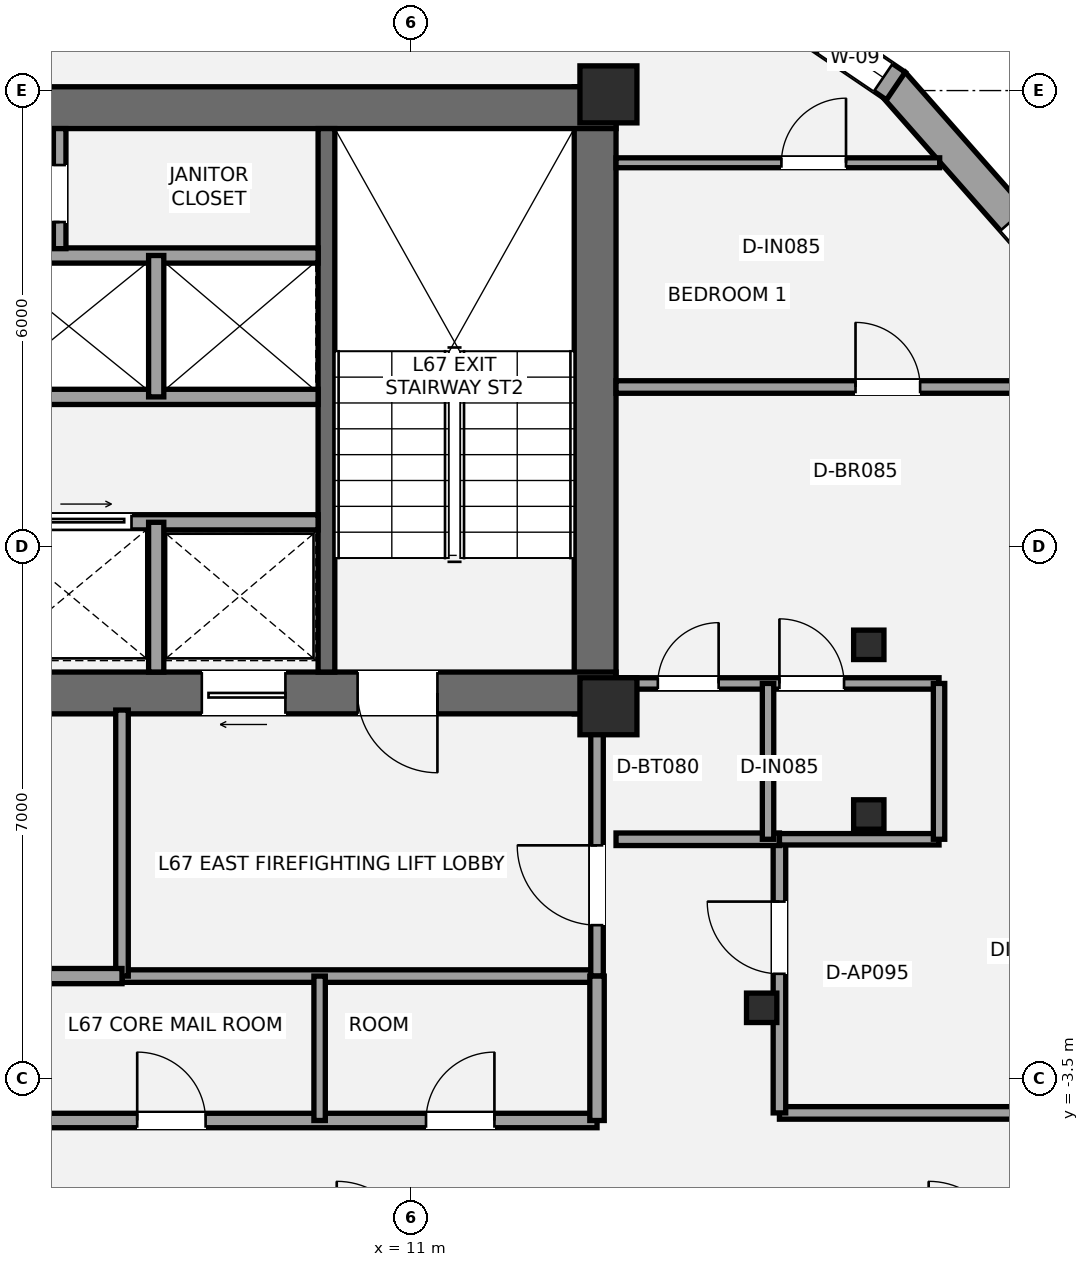
"""IFC4 building model, lengths in metres.
Left out: names, types, materials, properties, quantities, classifications, styles, units other than length and angle.
Written with IfcOpenShell. Run it as: python <this file> out.ifc"""

import sys

from ifc_helpers import new_model, si_unit, direction, frame, frame_2d, origin, origin_2d, place, context, subcontext, project, spatial, rectangle, i_section, extrude, element, fill, save


model = new_model("IFC4")
c1 = context("Model", 3, precision=1e-05, world=origin(), true_north=direction((0.0, 1.0)))
c2 = subcontext(c1, "Body", "Model", "MODEL_VIEW")
j1 = project(units=[si_unit("LENGTHUNIT", "METRE"), si_unit("PLANEANGLEUNIT", "RADIAN")], contexts=[c1])
p1 = place(None, origin())
s1 = spatial("IfcSite", under=j1, at=p1, CompositionType="ELEMENT")
p2 = place(p1, origin())
s2 = spatial("IfcBuilding", under=s1, at=p2, CompositionType="ELEMENT")
p3 = place(p2, frame((0.0, 0.0, 238.35)))
s3 = spatial("IfcBuildingStorey", under=s2, at=p3, CompositionType="ELEMENT", Elevation=238.35)
p4 = place(p3, frame((13.425, 1.3, 0.0), z_axis=(0.0, 0.0, 1.0), x_axis=(0.0, 1.0, 0.0)))
e1 = element("IfcWall", 1, at=p4, inside=s3, PredefinedType="SHEAR", context=c2, shape_type="SweptSolid", body=[
    extrude(rectangle(XDim=8.25, YDim=0.55, at=frame_2d((4.125, 0.0))), origin(), (0.0, 0.0, 1.0), 3.15),
])
p5 = place(p3, frame((4.525, 9.275, 0.0), z_axis=(0.0, 0.0, 1.0), x_axis=(1.0, 0.0, 0.0)))
e2 = element("IfcWall", 2, at=p5, inside=s3, PredefinedType="SHEAR", context=c2, shape_type="SweptSolid", body=[
    extrude(rectangle(XDim=9.175, YDim=0.55, at=frame_2d((4.587, 0.0))), origin(), (0.0, 0.0, 1.0), 3.15),
])
p6 = place(p3, frame((13.7, 1.575, 0.0), z_axis=(0.0, 0.0, 1.0), x_axis=(-1.0, 0.0, 0.0)))
e3 = element("IfcWall", 3, at=p6, inside=s3, PredefinedType="SHEAR", context=c2, shape_type="SweptSolid", body=[
    extrude(rectangle(XDim=8.775, YDim=0.55, at=frame_2d((4.387, 0.0))), origin(), (0.0, 0.0, 1.0), 3.15),
])
p7 = place(p6, frame((2.35, 0.0, 0.0)))
e4 = element("IfcOpeningElement", 4, at=p7, cuts=e3, PredefinedType="OPENING", context=c2, shape_type="SweptSolid", body=[
    extrude(rectangle(XDim=1.05, YDim=2.15, at=frame_2d((0.525, 1.075))), frame((0.0, 0.285, 0.0), z_axis=(0.0, -1.0, 0.0), x_axis=(1.0, 0.0, 0.0)), (0.0, 0.0, 1.0), 0.57),
])
p8 = place(p6, frame((4.35, 0.0, 0.0)))
e5 = element("IfcOpeningElement", 5, at=p8, cuts=e3, PredefinedType="OPENING", context=c2, shape_type="SweptSolid", body=[
    extrude(rectangle(XDim=1.1, YDim=2.2, at=frame_2d((0.55, 1.1))), frame((0.0, 0.285, 0.0), z_axis=(0.0, -1.0, 0.0), x_axis=(1.0, 0.0, 0.0)), (0.0, 0.0, 1.0), 0.57),
])
p9 = place(p3, frame((9.89, 1.85, 0.0), z_axis=(0.0, 0.0, 1.0), x_axis=(0.0, 1.0, 0.0)))
e6 = element("IfcWall", 6, at=p9, inside=s3, PredefinedType="SHEAR", context=c2, shape_type="SweptSolid", body=[
    extrude(rectangle(XDim=7.15, YDim=0.22, at=frame_2d((3.575, 0.0))), origin(), (0.0, 0.0, 1.0), 3.15),
])
for number, where, z_axis, x_axis in (
    (7, (13.6, 1.4, 0.0), (0.0, 0.0, 1.0), (1.0, 0.0, 0.0)),
    (8, (13.6, 9.45, 0.0), (0.0, 0.0, 1.0), (1.0, 0.0, 0.0)),
):
    element("IfcColumn", number, at=place(p3, frame(where, z_axis=z_axis, x_axis=x_axis)), inside=s3, PredefinedType="PILASTER", context=c2, shape_type="SweptSolid", body=[
        extrude(rectangle(XDim=0.75, YDim=0.75, at=origin_2d()), origin(), (0.0, 0.0, 1.0), 3.15),
    ])
for number, where, z_axis, x_axis in (
    (9, (17.026, 2.208, 0.0), (0.0, 0.0, 1.0), (1.0, 0.0, 0.0)),
    (10, (15.616, -2.567, 0.0), (0.0, 0.0, 1.0), (1.0, 0.0, 0.0)),
    (11, (17.026, -0.024, 0.0), (0.0, 0.0, 1.0), (1.0, 0.0, 0.0)),
):
    element("IfcColumn", number, at=place(p3, frame(where, z_axis=z_axis, x_axis=x_axis)), inside=s3, PredefinedType="COLUMN", context=c2, shape_type="SweptSolid", body=[
        extrude(i_section(OverallWidth=0.399, OverallDepth=0.387, WebThickness=0.021, FlangeThickness=0.033, at=origin_2d()), origin(), (0.0, 0.0, 1.0), 3.15),
    ])
p10 = place(p3, frame((17.34, 9.596, 0.0), z_axis=(0.0, 0.0, 1.0), x_axis=(0.66136043846, -0.750068243855, 0.0)))
e12 = element("IfcWall", 12, at=p10, inside=s3, PredefinedType="STANDARD", context=c2, shape_type="SweptSolid", body=[
    extrude(rectangle(XDim=3.432, YDim=0.44, at=frame_2d((1.716, 0.0))), origin(), (0.0, 0.0, 1.0), 2.336),
])
p11 = place(p10, frame((2.392, 0.0, 0.88)))
e13 = element("IfcOpeningElement", 13, at=p11, cuts=e12, PredefinedType="OPENING", context=c2, shape_type="SweptSolid", body=[
    extrude(rectangle(XDim=0.9, YDim=1.35, at=frame_2d((0.45, 0.675))), frame((0.0, 0.23, 0.0), z_axis=(0.0, -1.0, 0.0), x_axis=(1.0, 0.0, 0.0)), (0.0, 0.0, 1.0), 0.46),
])
p12 = place(p3, frame((14.242, 11.688, 0.0), z_axis=(0.0, 0.0, 1.0), x_axis=(0.827637036896, -0.561263694851, 0.0)))
e14 = element("IfcWall", 14, at=p12, inside=s3, PredefinedType="STANDARD", context=c2, shape_type="SweptSolid", body=[
    extrude(rectangle(XDim=3.793, YDim=0.44, at=frame_2d((1.896, 0.0))), origin(), (0.0, 0.0, 1.0), 2.336),
])
p13 = place(p12, frame((2.693, 0.0, 0.58)))
e15 = element("IfcOpeningElement", 15, at=p13, cuts=e14, PredefinedType="OPENING", context=c2, shape_type="SweptSolid", body=[
    extrude(rectangle(XDim=0.9, YDim=1.35, at=frame_2d((0.45, 0.675))), frame((0.0, 0.23, 0.0), z_axis=(0.0, -1.0, 0.0), x_axis=(1.0, 0.0, 0.0)), (0.0, 0.0, 1.0), 0.46),
])
p14 = place(p3, frame((7.2, -2.15, 0.0), z_axis=(0.0, 0.0, 1.0), x_axis=(1.0, 0.0, 0.0)))
e16 = element("IfcWall", 16, at=p14, inside=s3, PredefinedType="PARTITIONING", context=c2, shape_type="SweptSolid", body=[
    extrude(rectangle(XDim=6.25, YDim=0.165, at=frame_2d((3.125, 0.0))), origin(), (0.0, 0.0, 1.0), 2.97),
])
p15 = place(p3, frame((7.2, -2.15, 0.0), z_axis=(0.0, 0.0, 1.0), x_axis=(0.0, 1.0, 0.0)))
e17 = element("IfcWall", 17, at=p15, inside=s3, PredefinedType="PARTITIONING", context=c2, shape_type="SweptSolid", body=[
    extrude(rectangle(XDim=3.5, YDim=0.165, at=frame_2d((1.75, 0.0))), origin(), (0.0, 0.0, 1.0), 2.423),
])
p16 = place(p3, frame((13.45, -2.15, 0.0), z_axis=(0.0, 0.0, 1.0), x_axis=(0.0, 1.0, 0.0)))
e18 = element("IfcWall", 18, at=p16, inside=s3, PredefinedType="PARTITIONING", context=c2, shape_type="SweptSolid", body=[
    extrude(rectangle(XDim=3.5, YDim=0.165, at=frame_2d((1.75, 0.0))), origin(), (0.0, 0.0, 1.0), 2.423),
])
p17 = place(p16, frame((0.67, 0.0, 0.0)))
e19 = element("IfcOpeningElement", 19, at=p17, cuts=e18, PredefinedType="OPENING", context=c2, shape_type="SweptSolid", body=[
    extrude(rectangle(XDim=1.05, YDim=2.15, at=frame_2d((0.525, 1.075))), frame((0.0, 0.093, 0.0), z_axis=(0.0, -1.0, 0.0), x_axis=(1.0, 0.0, 0.0)), (0.0, 0.0, 1.0), 0.185),
])
p18 = place(p3, frame((4.95, -2.15, 0.0), z_axis=(0.0, 0.0, 1.0), x_axis=(1.0, 0.0, 0.0)))
e20 = element("IfcWall", 20, at=p18, inside=s3, PredefinedType="SOLIDWALL", context=c2, shape_type="SweptSolid", body=[
    extrude(rectangle(XDim=2.25, YDim=0.2, at=frame_2d((1.125, 0.0))), origin(), (0.0, 0.0, 1.0), 2.97),
])
p19 = place(p3, frame((5.475, 3.82, 0.0), z_axis=(0.0, 0.0, 1.0), x_axis=(1.0, 0.0, 0.0)))
e21 = element("IfcWall", 21, at=p19, inside=s3, PredefinedType="SOLIDWALL", context=c2, shape_type="SweptSolid", body=[
    extrude(rectangle(XDim=4.305, YDim=0.2, at=frame_2d((2.152, 0.0))), origin(), (0.0, 0.0, 1.0), 2.97),
])
p20 = place(p19, frame((0.65, 0.0, 0.0)))
e22 = element("IfcOpeningElement", 22, at=p20, cuts=e21, PredefinedType="OPENING", context=c2, shape_type="SweptSolid", body=[
    extrude(rectangle(XDim=1.2, YDim=2.2, at=frame_2d((0.6, 1.1))), frame((0.0, 0.11, 0.0), z_axis=(0.0, -1.0, 0.0), x_axis=(1.0, 0.0, 0.0)), (0.0, 0.0, 1.0), 0.22),
])
p21 = place(p3, frame((7.65, 1.85, 0.0), z_axis=(0.0, 0.0, 1.0), x_axis=(0.0, 1.0, 0.0)))
e23 = element("IfcWall", 23, at=p21, inside=s3, PredefinedType="SOLIDWALL", context=c2, shape_type="SweptSolid", body=[
    extrude(rectangle(XDim=1.97, YDim=0.2, at=frame_2d((0.985, 0.0))), origin(), (0.0, 0.0, 1.0), 2.97),
])
for number, where, z_axis, x_axis in (
    (24, (5.475, 5.47, 0.0), (0.0, 0.0, 1.0), (1.0, 0.0, 0.0)),
    (25, (5.475, 7.33, 0.0), (0.0, 0.0, 1.0), (1.0, 0.0, 0.0)),
):
    element("IfcWall", number, at=place(p3, frame(where, z_axis=z_axis, x_axis=x_axis)), inside=s3, PredefinedType="SOLIDWALL", context=c2, shape_type="SweptSolid", body=[
        extrude(rectangle(XDim=4.305, YDim=0.2, at=frame_2d((2.152, 0.0))), origin(), (0.0, 0.0, 1.0), 2.97),
    ])
p22 = place(p3, frame((7.65, 5.47, 0.0), z_axis=(0.0, 0.0, 1.0), x_axis=(0.0, 1.0, 0.0)))
e26 = element("IfcWall", 26, at=p22, inside=s3, PredefinedType="SOLIDWALL", context=c2, shape_type="SweptSolid", body=[
    extrude(rectangle(XDim=1.86, YDim=0.2, at=frame_2d((0.93, 0.0))), origin(), (0.0, 0.0, 1.0), 2.97),
])
p23 = place(p3, frame((6.38, 7.42, 0.0), z_axis=(0.0, 0.0, 1.0), x_axis=(0.0, 1.0, 0.0)))
e27 = element("IfcWall", 27, at=p23, inside=s3, PredefinedType="PARTITIONING", context=c2, shape_type="SweptSolid", body=[
    extrude(rectangle(XDim=1.58, YDim=0.165, at=frame_2d((0.79, 0.0))), origin(), (0.0, 0.0, 1.0), 2.97),
])
p24 = place(p23, frame((0.35, 0.0, 0.0)))
e28 = element("IfcOpeningElement", 28, at=p24, cuts=e27, PredefinedType="OPENING", context=c2, shape_type="SweptSolid", body=[
    extrude(rectangle(XDim=0.75, YDim=2.1, at=frame_2d((0.375, 1.05))), frame((0.0, 0.093, 0.0), z_axis=(0.0, -1.0, 0.0), x_axis=(1.0, 0.0, 0.0)), (0.0, 0.0, 1.0), 0.185),
])
p25 = place(p3, frame((2.1, -4.05, 0.0), z_axis=(0.0, 0.0, 1.0), x_axis=(1.0, 0.0, 0.0)))
e29 = element("IfcWall", 29, at=p25, inside=s3, PredefinedType="PLUMBINGWALL", context=c2, shape_type="SweptSolid", body=[
    extrude(rectangle(XDim=11.35, YDim=0.19, at=frame_2d((5.675, 0.0))), origin(), (0.0, 0.0, 1.0), 2.357),
])
p26 = place(p25, frame((1.4, 0.0, 0.0)))
e30 = element("IfcOpeningElement", 30, at=p26, cuts=e29, PredefinedType="OPENING", context=c2, shape_type="SweptSolid", body=[
    extrude(rectangle(XDim=0.9, YDim=2.1, at=frame_2d((0.45, 1.05))), frame((0.0, 0.105, 0.0), z_axis=(0.0, -1.0, 0.0), x_axis=(1.0, 0.0, 0.0)), (0.0, 0.0, 1.0), 0.21),
])
p27 = place(p25, frame((5.3, 0.0, 0.0)))
e31 = element("IfcOpeningElement", 31, at=p27, cuts=e29, PredefinedType="OPENING", context=c2, shape_type="SweptSolid", body=[
    extrude(rectangle(XDim=0.9, YDim=2.1, at=frame_2d((0.45, 1.05))), frame((0.0, 0.105, 0.0), z_axis=(0.0, -1.0, 0.0), x_axis=(1.0, 0.0, 0.0)), (0.0, 0.0, 1.0), 0.21),
])
p28 = place(p25, frame((9.1, 0.0, 0.0)))
e32 = element("IfcOpeningElement", 32, at=p28, cuts=e29, PredefinedType="OPENING", context=c2, shape_type="SweptSolid", body=[
    extrude(rectangle(XDim=0.9, YDim=2.1, at=frame_2d((0.45, 1.05))), frame((0.0, 0.105, 0.0), z_axis=(0.0, -1.0, 0.0), x_axis=(1.0, 0.0, 0.0)), (0.0, 0.0, 1.0), 0.21),
])
p29 = place(p3, frame((13.45, -4.05, 0.0), z_axis=(0.0, 0.0, 1.0), x_axis=(0.0, 1.0, 0.0)))
e33 = element("IfcWall", 33, at=p29, inside=s3, PredefinedType="PLUMBINGWALL", context=c2, shape_type="SweptSolid", body=[
    extrude(rectangle(XDim=1.9, YDim=0.19, at=frame_2d((0.95, 0.0))), origin(), (0.0, 0.0, 1.0), 2.423),
])
p30 = place(p3, frame((9.8, -4.05, 0.0), z_axis=(0.0, 0.0, 1.0), x_axis=(0.0, 1.0, 0.0)))
e34 = element("IfcWall", 34, at=p30, inside=s3, PredefinedType="PLUMBINGWALL", context=c2, shape_type="SweptSolid", body=[
    extrude(rectangle(XDim=1.9, YDim=0.15, at=frame_2d((0.95, 0.0))), origin(), (0.0, 0.0, 1.0), 2.97),
])
p31 = place(p3, frame((15.85, -3.95, 0.0), z_axis=(0.0, 0.0, 1.0), x_axis=(1.0, 0.0, 0.0)))
e35 = element("IfcWall", 35, at=p31, inside=s3, PredefinedType="PARTITIONING", context=c2, shape_type="SweptSolid", body=[
    extrude(rectangle(XDim=4.964, YDim=0.165, at=frame_2d((2.482, 0.0))), origin(), (0.0, 0.0, 1.0), 2.423),
])
p32 = place(p3, frame((15.85, -3.95, 0.0), z_axis=(0.0, 0.0, 1.0), x_axis=(0.0, 1.0, 0.0)))
e36 = element("IfcWall", 36, at=p32, inside=s3, PredefinedType="PARTITIONING", context=c2, shape_type="SweptSolid", body=[
    extrude(rectangle(XDim=3.6, YDim=0.165, at=frame_2d((1.8, 0.0))), origin(), (0.0, 0.0, 1.0), 2.357),
])
p33 = place(p32, frame((1.83, 0.0, 0.0)))
e37 = element("IfcOpeningElement", 37, at=p33, cuts=e36, PredefinedType="OPENING", context=c2, shape_type="SweptSolid", body=[
    extrude(rectangle(XDim=0.95, YDim=2.15, at=frame_2d((0.475, 1.075))), frame((0.0, 0.093, 0.0), z_axis=(0.0, -1.0, 0.0), x_axis=(1.0, 0.0, 0.0)), (0.0, 0.0, 1.0), 0.185),
])
p34 = place(p3, frame((13.7, -0.35, 0.0), z_axis=(0.0, 0.0, 1.0), x_axis=(1.0, 0.0, 0.0)))
e38 = element("IfcWall", 38, at=p34, inside=s3, PredefinedType="PARTITIONING", context=c2, shape_type="SweptSolid", body=[
    extrude(rectangle(XDim=2.15, YDim=0.165, at=frame_2d((1.075, 0.0))), origin(), (0.0, 0.0, 1.0), 2.423),
])
p35 = place(p3, frame((13.7, 5.6, 0.0), z_axis=(0.0, 0.0, 1.0), x_axis=(1.0, 0.0, 0.0)))
e39 = element("IfcWall", 39, at=p35, inside=s3, PredefinedType="PARTITIONING", context=c2, shape_type="SweptSolid", body=[
    extrude(rectangle(XDim=6.36, YDim=0.165, at=frame_2d((3.18, 0.0))), origin(), (0.0, 0.0, 1.0), 2.423),
])
p36 = place(p35, frame((3.151, 0.0, 0.0)))
e40 = element("IfcOpeningElement", 40, at=p36, cuts=e39, PredefinedType="OPENING", context=c2, shape_type="SweptSolid", body=[
    extrude(rectangle(XDim=0.85, YDim=2.1, at=frame_2d((0.425, 1.05))), frame((0.0, 0.093, 0.0), z_axis=(0.0, -1.0, 0.0), x_axis=(1.0, 0.0, 0.0)), (0.0, 0.0, 1.0), 0.185),
])
p37 = place(p3, frame((13.7, 1.7, 0.0), z_axis=(0.0, 0.0, 1.0), x_axis=(1.0, 0.0, 0.0)))
e41 = element("IfcWall", 41, at=p37, inside=s3, PredefinedType="PLUMBINGWALL", context=c2, shape_type="SweptSolid", body=[
    extrude(rectangle(XDim=4.25, YDim=0.15, at=frame_2d((2.125, 0.0))), origin(), (0.0, 0.0, 1.0), 2.423),
])
p38 = place(p37, frame((0.55, 0.0, 0.0)))
e42 = element("IfcOpeningElement", 42, at=p38, cuts=e41, PredefinedType="OPENING", context=c2, shape_type="SweptSolid", body=[
    extrude(rectangle(XDim=0.8, YDim=2.1, at=frame_2d((0.4, 1.05))), frame((0.0, 0.085, 0.0), z_axis=(0.0, -1.0, 0.0), x_axis=(1.0, 0.0, 0.0)), (0.0, 0.0, 1.0), 0.17),
])
p39 = place(p37, frame((2.15, 0.0, 0.0)))
e43 = element("IfcOpeningElement", 43, at=p39, cuts=e41, PredefinedType="OPENING", context=c2, shape_type="SweptSolid", body=[
    extrude(rectangle(XDim=0.85, YDim=2.1, at=frame_2d((0.425, 1.05))), frame((0.0, 0.085, 0.0), z_axis=(0.0, -1.0, 0.0), x_axis=(1.0, 0.0, 0.0)), (0.0, 0.0, 1.0), 0.17),
])
p40 = place(p3, frame((15.85, -0.35, 0.0), z_axis=(0.0, 0.0, 1.0), x_axis=(1.0, 0.0, 0.0)))
e44 = element("IfcWall", 44, at=p40, inside=s3, PredefinedType="PLUMBINGWALL", context=c2, shape_type="SweptSolid", body=[
    extrude(rectangle(XDim=2.1, YDim=0.15, at=frame_2d((1.05, 0.0))), origin(), (0.0, 0.0, 1.0), 2.423),
])
for number, where, z_axis, x_axis in (
    (45, (15.7, -0.35, 0.0), (0.0, 0.0, 1.0), (0.0, 1.0, 0.0)),
    (46, (17.95, -0.35, 0.0), (0.0, 0.0, 1.0), (0.0, 1.0, 0.0)),
):
    element("IfcWall", number, at=place(p3, frame(where, z_axis=z_axis, x_axis=x_axis)), inside=s3, PredefinedType="PLUMBINGWALL", context=c2, shape_type="SweptSolid", body=[
        extrude(rectangle(XDim=2.05, YDim=0.15, at=frame_2d((1.025, 0.0))), origin(), (0.0, 0.0, 1.0), 2.97),
    ])
p41 = place(p3, frame((13.7, 8.55, 0.0), z_axis=(0.0, 0.0, 1.0), x_axis=(1.0, 0.0, 0.0)))
e47 = element("IfcWall", 47, at=p41, inside=s3, PredefinedType="PARTITIONING", context=c2, shape_type="SweptSolid", body=[
    extrude(rectangle(XDim=4.258, YDim=0.13, at=frame_2d((2.129, 0.0))), origin(), (0.0, 0.0, 1.0), 2.423),
])
p42 = place(p41, frame((2.176, 0.0, 0.0)))
e48 = element("IfcOpeningElement", 48, at=p42, cuts=e47, PredefinedType="OPENING", context=c2, shape_type="SweptSolid", body=[
    extrude(rectangle(XDim=0.85, YDim=2.1, at=frame_2d((0.425, 1.05))), frame((0.0, 0.075, 0.0), z_axis=(0.0, -1.0, 0.0), x_axis=(1.0, 0.0, 0.0)), (0.0, 0.0, 1.0), 0.15),
])
p43 = place(p13, origin())
e49 = element("IfcWindow", 49, at=p43, inside=s3, PartitioningType="SINGLE_PANEL", PredefinedType="WINDOW", context=c2, shape_type="SweptSolid", body=[
    extrude(rectangle(XDim=0.9, YDim=1.35, at=frame_2d((0.45, 0.675))), frame((0.0, -0.01, 0.0), z_axis=(0.0, -1.0, 0.0), x_axis=(1.0, 0.0, 0.0)), (0.0, 0.0, 1.0), 0.06),
])
fill(e15, e49)
p44 = place(p11, origin())
e50 = element("IfcWindow", 50, at=p44, inside=s3, PartitioningType="SINGLE_PANEL", PredefinedType="WINDOW", context=c2, shape_type="SweptSolid", body=[
    extrude(rectangle(XDim=0.9, YDim=1.35, at=frame_2d((0.45, 0.675))), frame((0.0, -0.01, 0.0), z_axis=(0.0, -1.0, 0.0), x_axis=(1.0, 0.0, 0.0)), (0.0, 0.0, 1.0), 0.06),
])
fill(e13, e50)
p45 = place(p7, origin())
e51 = element("IfcDoor", 51, at=p45, inside=s3, OperationType="SINGLE_SWING_LEFT", PredefinedType="DOOR", context=c2, shape_type="SweptSolid", body=[
    extrude(rectangle(XDim=1.05, YDim=2.15, at=frame_2d((0.525, 1.075))), frame((0.0, 0.025, 0.0), z_axis=(0.0, -1.0, 0.0), x_axis=(1.0, 0.0, 0.0)), (0.0, 0.0, 1.0), 0.05),
])
fill(e4, e51)
p46 = place(p17, origin())
e52 = element("IfcDoor", 52, at=p46, inside=s3, OperationType="SINGLE_SWING_RIGHT", PredefinedType="DOOR", context=c2, shape_type="SweptSolid", body=[
    extrude(rectangle(XDim=1.05, YDim=2.15, at=frame_2d((0.525, 1.075))), frame((0.0, 0.025, 0.0), z_axis=(0.0, -1.0, 0.0), x_axis=(1.0, 0.0, 0.0)), (0.0, 0.0, 1.0), 0.05),
])
fill(e19, e52)
p47 = place(p8, origin())
e53 = element("IfcDoor", 53, at=p47, inside=s3, OperationType="SLIDING_TO_LEFT", PredefinedType="DOOR", context=c2, shape_type="SweptSolid", body=[
    extrude(rectangle(XDim=1.1, YDim=2.2, at=frame_2d((0.55, 1.1))), frame((0.0, 0.025, 0.0), z_axis=(0.0, -1.0, 0.0), x_axis=(1.0, 0.0, 0.0)), (0.0, 0.0, 1.0), 0.05),
])
fill(e5, e53)
p48 = place(p20, origin())
e54 = element("IfcDoor", 54, at=p48, inside=s3, OperationType="SLIDING_TO_RIGHT", PredefinedType="DOOR", context=c2, shape_type="SweptSolid", body=[
    extrude(rectangle(XDim=1.2, YDim=2.2, at=frame_2d((0.6, 1.1))), frame((0.0, 0.025, 0.0), z_axis=(0.0, -1.0, 0.0), x_axis=(1.0, 0.0, 0.0)), (0.0, 0.0, 1.0), 0.05),
])
fill(e22, e54)
p49 = place(p24, origin())
e55 = element("IfcDoor", 55, at=p49, inside=s3, OperationType="SINGLE_SWING_LEFT", PredefinedType="DOOR", context=c2, shape_type="SweptSolid", body=[
    extrude(rectangle(XDim=0.75, YDim=2.1, at=frame_2d((0.375, 1.05))), frame((0.0, 0.025, 0.0), z_axis=(0.0, -1.0, 0.0), x_axis=(1.0, 0.0, 0.0)), (0.0, 0.0, 1.0), 0.05),
])
fill(e28, e55)
p50 = place(p27, origin())
e56 = element("IfcDoor", 56, at=p50, inside=s3, OperationType="SINGLE_SWING_LEFT", PredefinedType="DOOR", context=c2, shape_type="SweptSolid", body=[
    extrude(rectangle(XDim=0.9, YDim=2.1, at=frame_2d((0.45, 1.05))), frame((0.0, 0.025, 0.0), z_axis=(0.0, -1.0, 0.0), x_axis=(1.0, 0.0, 0.0)), (0.0, 0.0, 1.0), 0.05),
])
fill(e31, e56)
p51 = place(p28, origin())
e57 = element("IfcDoor", 57, at=p51, inside=s3, OperationType="SINGLE_SWING_RIGHT", PredefinedType="DOOR", context=c2, shape_type="SweptSolid", body=[
    extrude(rectangle(XDim=0.9, YDim=2.1, at=frame_2d((0.45, 1.05))), frame((0.0, 0.025, 0.0), z_axis=(0.0, -1.0, 0.0), x_axis=(1.0, 0.0, 0.0)), (0.0, 0.0, 1.0), 0.05),
])
fill(e32, e57)
p52 = place(p33, origin())
e58 = element("IfcDoor", 58, at=p52, inside=s3, OperationType="SINGLE_SWING_RIGHT", PredefinedType="DOOR", context=c2, shape_type="SweptSolid", body=[
    extrude(rectangle(XDim=0.95, YDim=2.15, at=frame_2d((0.475, 1.075))), frame((0.0, 0.025, 0.0), z_axis=(0.0, -1.0, 0.0), x_axis=(1.0, 0.0, 0.0)), (0.0, 0.0, 1.0), 0.05),
])
fill(e37, e58)
p53 = place(p38, origin())
e59 = element("IfcDoor", 59, at=p53, inside=s3, OperationType="SINGLE_SWING_RIGHT", PredefinedType="DOOR", context=c2, shape_type="SweptSolid", body=[
    extrude(rectangle(XDim=0.8, YDim=2.1, at=frame_2d((0.4, 1.05))), frame((0.0, 0.025, 0.0), z_axis=(0.0, -1.0, 0.0), x_axis=(1.0, 0.0, 0.0)), (0.0, 0.0, 1.0), 0.05),
])
fill(e42, e59)
p54 = place(p39, origin())
e60 = element("IfcDoor", 60, at=p54, inside=s3, OperationType="SINGLE_SWING_LEFT", PredefinedType="DOOR", context=c2, shape_type="SweptSolid", body=[
    extrude(rectangle(XDim=0.85, YDim=2.1, at=frame_2d((0.425, 1.05))), frame((0.0, 0.025, 0.0), z_axis=(0.0, -1.0, 0.0), x_axis=(1.0, 0.0, 0.0)), (0.0, 0.0, 1.0), 0.05),
])
fill(e43, e60)
p55 = place(p36, origin())
e61 = element("IfcDoor", 61, at=p55, inside=s3, OperationType="SINGLE_SWING_LEFT", PredefinedType="DOOR", context=c2, shape_type="SweptSolid", body=[
    extrude(rectangle(XDim=0.85, YDim=2.1, at=frame_2d((0.425, 1.05))), frame((0.0, 0.025, 0.0), z_axis=(0.0, -1.0, 0.0), x_axis=(1.0, 0.0, 0.0)), (0.0, 0.0, 1.0), 0.05),
])
fill(e40, e61)
p56 = place(p42, origin())
e62 = element("IfcDoor", 62, at=p56, inside=s3, OperationType="SINGLE_SWING_RIGHT", PredefinedType="DOOR", context=c2, shape_type="SweptSolid", body=[
    extrude(rectangle(XDim=0.85, YDim=2.1, at=frame_2d((0.425, 1.05))), frame((0.0, 0.025, 0.0), z_axis=(0.0, -1.0, 0.0), x_axis=(1.0, 0.0, 0.0)), (0.0, 0.0, 1.0), 0.05),
])
fill(e48, e62)
save(model, sys.argv[1])
